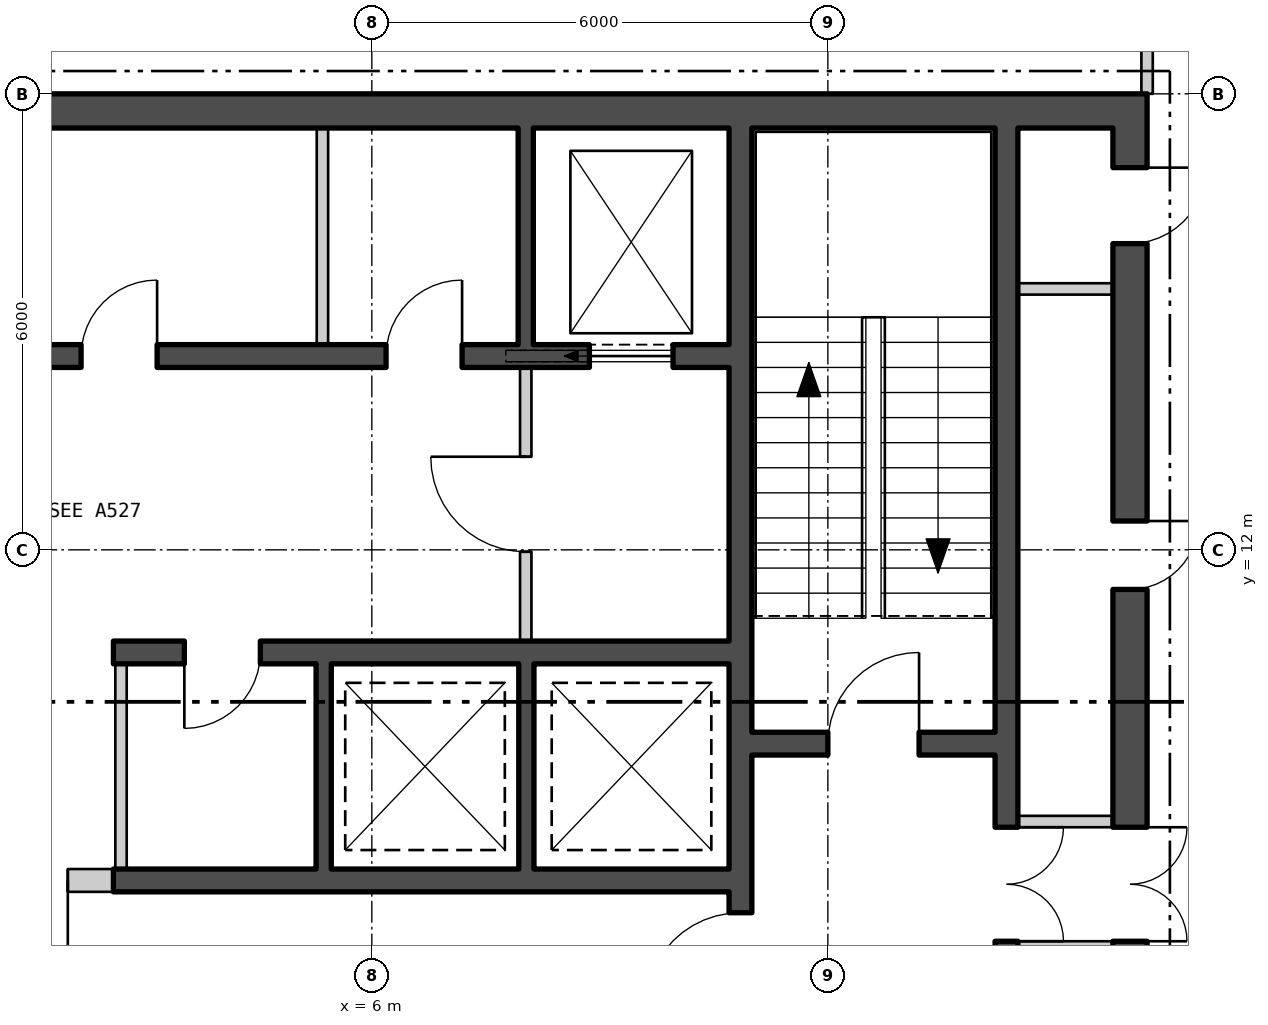
"""IFC4 building model, lengths in metres.
Left out: names, types, materials, properties, quantities, classifications, styles, units other than length and angle.
Written with IfcOpenShell. Run it as: python <this file> out.ifc"""

import sys

from ifc_helpers import new_model, si_unit, direction, frame, frame_2d, origin, place, context, subcontext, project, spatial, polyline, rectangle, outline, extrude, element, fill, save


model = new_model("IFC4")
c1 = context("Model", 3, precision=1e-05, world=origin(), true_north=direction((0.0, 1.0)))
c2 = subcontext(c1, "Body", "Model", "MODEL_VIEW")
j1 = project(units=[si_unit("LENGTHUNIT", "METRE"), si_unit("PLANEANGLEUNIT", "RADIAN")], contexts=[c1])
p1 = place(None, origin())
s1 = spatial("IfcSite", under=j1, at=p1, CompositionType="ELEMENT")
p2 = place(p1, origin())
s2 = spatial("IfcBuilding", under=s1, at=p2, CompositionType="ELEMENT")
p3 = place(p2, frame((0.0, 0.0, 216.0)))
s3 = spatial("IfcBuildingStorey", under=s2, at=p3, CompositionType="ELEMENT", Elevation=216.0)
p4 = place(p3, frame((3.36, -25.466, -0.18), z_axis=(0.0, 0.0, 1.0), x_axis=(0.500000335318, 0.866025210188, 0.0)))
e1 = element("IfcWall", 1, at=p4, inside=s3, PredefinedType="SOLIDWALL", context=c2, shape_type="SweptSolid", body=[
    extrude(outline(polyline([(-0.13, -0.225), (45.88, -0.225), (45.62, 0.225), (0.13, 0.225), (-0.13, -0.225)])), origin(), (0.0, 0.0, 1.0), 3.68),
])
p5 = place(p4, frame((1.425, 0.0, 1.08)))
e2 = element("IfcOpeningElement", 2, at=p5, cuts=e1, PredefinedType="OPENING", context=c2, shape_type="SweptSolid", body=[
    extrude(rectangle(XDim=2.4, YDim=2.0, at=frame_2d((1.2, 1.0))), frame((0.0, 0.235, 0.0), z_axis=(0.0, -1.0, 0.0), x_axis=(1.0, 0.0, 0.0)), (0.0, 0.0, 1.0), 0.47),
])
p6 = place(p4, frame((5.895, 0.0, 1.08)))
e3 = element("IfcOpeningElement", 3, at=p6, cuts=e1, PredefinedType="OPENING", context=c2, shape_type="SweptSolid", body=[
    extrude(rectangle(XDim=2.4, YDim=2.0, at=frame_2d((1.2, 1.0))), frame((0.0, 0.235, 0.0), z_axis=(0.0, -1.0, 0.0), x_axis=(1.0, 0.0, 0.0)), (0.0, 0.0, 1.0), 0.47),
])
p7 = place(p4, frame((10.403, 0.0, 1.08)))
e4 = element("IfcOpeningElement", 4, at=p7, cuts=e1, PredefinedType="OPENING", context=c2, shape_type="SweptSolid", body=[
    extrude(rectangle(XDim=2.4, YDim=2.0, at=frame_2d((1.2, 1.0))), frame((0.0, 0.235, 0.0), z_axis=(0.0, -1.0, 0.0), x_axis=(1.0, 0.0, 0.0)), (0.0, 0.0, 1.0), 0.47),
])
p8 = place(p4, frame((14.912, 0.0, 1.08)))
e5 = element("IfcOpeningElement", 5, at=p8, cuts=e1, PredefinedType="OPENING", context=c2, shape_type="SweptSolid", body=[
    extrude(rectangle(XDim=2.4, YDim=2.0, at=frame_2d((1.2, 1.0))), frame((0.0, 0.235, 0.0), z_axis=(0.0, -1.0, 0.0), x_axis=(1.0, 0.0, 0.0)), (0.0, 0.0, 1.0), 0.47),
])
p9 = place(p4, frame((19.421, 0.0, 1.08)))
e6 = element("IfcOpeningElement", 6, at=p9, cuts=e1, PredefinedType="OPENING", context=c2, shape_type="SweptSolid", body=[
    extrude(rectangle(XDim=2.4, YDim=2.0, at=frame_2d((1.2, 1.0))), frame((0.0, 0.235, 0.0), z_axis=(0.0, -1.0, 0.0), x_axis=(1.0, 0.0, 0.0)), (0.0, 0.0, 1.0), 0.47),
])
p10 = place(p4, frame((23.929, 0.0, 1.08)))
e7 = element("IfcOpeningElement", 7, at=p10, cuts=e1, PredefinedType="OPENING", context=c2, shape_type="SweptSolid", body=[
    extrude(rectangle(XDim=2.4, YDim=2.0, at=frame_2d((1.2, 1.0))), frame((0.0, 0.235, 0.0), z_axis=(0.0, -1.0, 0.0), x_axis=(1.0, 0.0, 0.0)), (0.0, 0.0, 1.0), 0.47),
])
p11 = place(p4, frame((32.947, 0.0, 1.08)))
e8 = element("IfcOpeningElement", 8, at=p11, cuts=e1, PredefinedType="OPENING", context=c2, shape_type="SweptSolid", body=[
    extrude(rectangle(XDim=2.4, YDim=2.0, at=frame_2d((1.2, 1.0))), frame((0.0, 0.235, 0.0), z_axis=(0.0, -1.0, 0.0), x_axis=(1.0, 0.0, 0.0)), (0.0, 0.0, 1.0), 0.47),
])
p12 = place(p4, frame((37.455, 0.0, 1.08)))
e9 = element("IfcOpeningElement", 9, at=p12, cuts=e1, PredefinedType="OPENING", context=c2, shape_type="SweptSolid", body=[
    extrude(rectangle(XDim=2.4, YDim=2.0, at=frame_2d((1.2, 1.0))), frame((0.0, 0.235, 0.0), z_axis=(0.0, -1.0, 0.0), x_axis=(1.0, 0.0, 0.0)), (0.0, 0.0, 1.0), 0.47),
])
p13 = place(p4, frame((41.925, 0.0, 1.08)))
e10 = element("IfcOpeningElement", 10, at=p13, cuts=e1, PredefinedType="OPENING", context=c2, shape_type="SweptSolid", body=[
    extrude(rectangle(XDim=2.4, YDim=2.0, at=frame_2d((1.2, 1.0))), frame((0.0, 0.235, 0.0), z_axis=(0.0, -1.0, 0.0), x_axis=(1.0, 0.0, 0.0)), (0.0, 0.0, 1.0), 0.47),
])
p14 = place(p3, frame((-16.2, 17.775, 0.0), z_axis=(0.0, 0.0, 1.0), x_axis=(1.0, 0.0, 0.0)))
e11 = element("IfcWall", 11, at=p14, inside=s3, PredefinedType="SHEAR", context=c2, shape_type="SweptSolid", body=[
    extrude(rectangle(XDim=32.4, YDim=0.45, at=frame_2d((16.2, 0.0))), origin(), (0.0, 0.0, 1.0), 3.7),
])
p15 = place(p3, frame((15.975, 2.45, 0.0), z_axis=(0.0, 0.0, 1.0), x_axis=(0.0, 1.0, 0.0)))
e12 = element("IfcWall", 12, at=p15, inside=s3, PredefinedType="SHEAR", context=c2, shape_type="SweptSolid", body=[
    extrude(rectangle(XDim=15.1, YDim=0.45, at=frame_2d((7.55, 0.0))), origin(), (0.0, 0.0, 1.0), 3.7),
])
p16 = place(p15, frame((4.4, 0.0, 0.0)))
e13 = element("IfcOpeningElement", 13, at=p16, cuts=e12, PredefinedType="OPENING", context=c2, shape_type="SweptSolid", body=[
    extrude(rectangle(XDim=1.5, YDim=2.1, at=frame_2d((0.75, 1.05))), frame((0.0, 0.235, 0.0), z_axis=(0.0, -1.0, 0.0), x_axis=(1.0, 0.0, 0.0)), (0.0, 0.0, 1.0), 0.47),
])
p17 = place(p15, frame((0.85, 0.0, 0.0)))
e14 = element("IfcOpeningElement", 14, at=p17, cuts=e12, PredefinedType="OPENING", context=c2, shape_type="SweptSolid", body=[
    extrude(rectangle(XDim=0.9, YDim=2.1, at=frame_2d((0.45, 1.05))), frame((0.0, 0.235, 0.0), z_axis=(0.0, -1.0, 0.0), x_axis=(1.0, 0.0, 0.0)), (0.0, 0.0, 1.0), 0.47),
])
p18 = place(p15, frame((3.05, 0.0, 0.0)))
e15 = element("IfcOpeningElement", 15, at=p18, cuts=e12, PredefinedType="OPENING", context=c2, shape_type="SweptSolid", body=[
    extrude(rectangle(XDim=0.9, YDim=2.1, at=frame_2d((0.45, 1.05))), frame((0.0, 0.235, 0.0), z_axis=(0.0, -1.0, 0.0), x_axis=(1.0, 0.0, 0.0)), (0.0, 0.0, 1.0), 0.47),
])
p19 = place(p15, frame((9.029, 0.0, 0.0)))
e16 = element("IfcOpeningElement", 16, at=p19, cuts=e12, PredefinedType="OPENING", context=c2, shape_type="SweptSolid", body=[
    extrude(rectangle(XDim=0.9, YDim=2.1, at=frame_2d((0.45, 1.05))), frame((0.0, 0.235, 0.0), z_axis=(0.0, -1.0, 0.0), x_axis=(1.0, 0.0, 0.0)), (0.0, 0.0, 1.0), 0.47),
])
p20 = place(p15, frame((13.579, 0.0, 0.0)))
e17 = element("IfcOpeningElement", 17, at=p20, cuts=e12, PredefinedType="OPENING", context=c2, shape_type="SweptSolid", body=[
    extrude(rectangle(XDim=1.0, YDim=2.1, at=frame_2d((0.5, 1.05))), frame((0.0, 0.235, 0.0), z_axis=(0.0, -1.0, 0.0), x_axis=(1.0, 0.0, 0.0)), (0.0, 0.0, 1.0), 0.47),
])
p21 = place(p3, frame((10.85, 2.45, 0.0), z_axis=(0.0, 0.0, 1.0), x_axis=(0.0, 1.0, 0.0)))
e18 = element("IfcWall", 18, at=p21, inside=s3, PredefinedType="SHEAR", context=c2, shape_type="SweptSolid", body=[
    extrude(rectangle(XDim=15.1, YDim=0.3, at=frame_2d((7.55, 0.0))), origin(), (0.0, 0.0, 1.0), 3.7),
])
p22 = place(p21, frame((3.525, 0.0, 0.0)))
e19 = element("IfcOpeningElement", 19, at=p22, cuts=e18, PredefinedType="OPENING", context=c2, shape_type="SweptSolid", body=[
    extrude(rectangle(XDim=1.25, YDim=2.1, at=frame_2d((0.625, 1.05))), frame((0.0, 0.16, 0.0), z_axis=(0.0, -1.0, 0.0), x_axis=(1.0, 0.0, 0.0)), (0.0, 0.0, 1.0), 0.32),
])
p23 = place(p21, frame((1.15, 0.0, 0.0)))
e20 = element("IfcOpeningElement", 20, at=p23, cuts=e18, PredefinedType="OPENING", context=c2, shape_type="SweptSolid", body=[
    extrude(rectangle(XDim=1.0, YDim=2.1, at=frame_2d((0.5, 1.05))), frame((0.0, 0.16, 0.0), z_axis=(0.0, -1.0, 0.0), x_axis=(1.0, 0.0, 0.0)), (0.0, 0.0, 1.0), 0.32),
])
p24 = place(p3, frame((14.35, 2.45, 0.0), z_axis=(0.0, 0.0, 1.0), x_axis=(0.0, 1.0, 0.0)))
e21 = element("IfcWall", 21, at=p24, inside=s3, PredefinedType="SHEAR", context=c2, shape_type="SweptSolid", body=[
    extrude(rectangle(XDim=15.1, YDim=0.3, at=frame_2d((7.55, 0.0))), origin(), (0.0, 0.0, 1.0), 3.7),
])
p25 = place(p24, frame((4.4, 0.0, 0.0)))
e22 = element("IfcOpeningElement", 22, at=p25, cuts=e21, PredefinedType="OPENING", context=c2, shape_type="SweptSolid", body=[
    extrude(rectangle(XDim=1.5, YDim=2.1, at=frame_2d((0.75, 1.05))), frame((0.0, 0.16, 0.0), z_axis=(0.0, -1.0, 0.0), x_axis=(1.0, 0.0, 0.0)), (0.0, 0.0, 1.0), 0.32),
])
p26 = place(p3, frame((11.0, 9.45, 0.0), z_axis=(0.0, 0.0, 1.0), x_axis=(1.0, 0.0, 0.0)))
e23 = element("IfcWall", 23, at=p26, inside=s3, PredefinedType="SHEAR", context=c2, shape_type="SweptSolid", body=[
    extrude(rectangle(XDim=3.2, YDim=0.3, at=frame_2d((1.6, 0.0))), origin(), (0.0, 0.0, 1.0), 3.7),
])
p27 = place(p26, frame((1.0, 0.0, 0.0)))
e24 = element("IfcOpeningElement", 24, at=p27, cuts=e23, PredefinedType="OPENING", context=c2, shape_type="SweptSolid", body=[
    extrude(rectangle(XDim=1.2, YDim=2.1, at=frame_2d((0.6, 1.05))), frame((0.0, 0.16, 0.0), z_axis=(0.0, -1.0, 0.0), x_axis=(1.0, 0.0, 0.0)), (0.0, 0.0, 1.0), 0.32),
])
p28 = place(p3, frame((-10.7, 14.55, 0.0), z_axis=(0.0, 0.0, 1.0), x_axis=(1.0, 0.0, 0.0)))
e25 = element("IfcWall", 25, at=p28, inside=s3, PredefinedType="SHEAR", context=c2, shape_type="SweptSolid", body=[
    extrude(rectangle(XDim=21.4, YDim=0.3, at=frame_2d((10.7, 0.0))), origin(), (0.0, 0.0, 1.0), 3.7),
])
p29 = place(p28, frame((0.738, 0.0, 0.0)))
e26 = element("IfcOpeningElement", 26, at=p29, cuts=e25, PredefinedType="OPENING", context=c2, shape_type="SweptSolid", body=[
    extrude(rectangle(XDim=1.1, YDim=2.1, at=frame_2d((0.55, 1.05))), frame((0.0, 0.16, 0.0), z_axis=(0.0, -1.0, 0.0), x_axis=(1.0, 0.0, 0.0)), (0.0, 0.0, 1.0), 0.32),
])
p30 = place(p28, frame((3.462, 0.0, 0.0)))
e27 = element("IfcOpeningElement", 27, at=p30, cuts=e25, PredefinedType="OPENING", context=c2, shape_type="SweptSolid", body=[
    extrude(rectangle(XDim=1.1, YDim=2.1, at=frame_2d((0.55, 1.05))), frame((0.0, 0.16, 0.0), z_axis=(0.0, -1.0, 0.0), x_axis=(1.0, 0.0, 0.0)), (0.0, 0.0, 1.0), 0.32),
])
p31 = place(p28, frame((6.138, 0.0, 0.0)))
e28 = element("IfcOpeningElement", 28, at=p31, cuts=e25, PredefinedType="OPENING", context=c2, shape_type="SweptSolid", body=[
    extrude(rectangle(XDim=1.1, YDim=2.1, at=frame_2d((0.55, 1.05))), frame((0.0, 0.16, 0.0), z_axis=(0.0, -1.0, 0.0), x_axis=(1.0, 0.0, 0.0)), (0.0, 0.0, 1.0), 0.32),
])
p32 = place(p28, frame((8.812, 0.0, 0.0)))
e29 = element("IfcOpeningElement", 29, at=p32, cuts=e25, PredefinedType="OPENING", context=c2, shape_type="SweptSolid", body=[
    extrude(rectangle(XDim=1.1, YDim=2.1, at=frame_2d((0.55, 1.05))), frame((0.0, 0.16, 0.0), z_axis=(0.0, -1.0, 0.0), x_axis=(1.0, 0.0, 0.0)), (0.0, 0.0, 1.0), 0.32),
])
p33 = place(p28, frame((19.562, 0.0, 0.0)))
e30 = element("IfcOpeningElement", 30, at=p33, cuts=e25, PredefinedType="OPENING", context=c2, shape_type="SweptSolid", body=[
    extrude(rectangle(XDim=1.1, YDim=2.1, at=frame_2d((0.55, 1.05))), frame((0.0, 0.16, 0.0), z_axis=(0.0, -1.0, 0.0), x_axis=(1.0, 0.0, 0.0)), (0.0, 0.0, 1.0), 0.32),
])
p34 = place(p28, frame((12.875, 0.0, 0.0)))
e31 = element("IfcOpeningElement", 31, at=p34, cuts=e25, PredefinedType="OPENING", context=c2, shape_type="SweptSolid", body=[
    extrude(rectangle(XDim=1.0, YDim=2.1, at=frame_2d((0.5, 1.05))), frame((0.0, 0.16, 0.0), z_axis=(0.0, -1.0, 0.0), x_axis=(1.0, 0.0, 0.0)), (0.0, 0.0, 1.0), 0.32),
])
p35 = place(p28, frame((16.887, 0.0, 0.0)))
e32 = element("IfcOpeningElement", 32, at=p35, cuts=e25, PredefinedType="OPENING", context=c2, shape_type="SweptSolid", body=[
    extrude(rectangle(XDim=1.0, YDim=2.1, at=frame_2d((0.5, 1.05))), frame((0.0, 0.16, 0.0), z_axis=(0.0, -1.0, 0.0), x_axis=(1.0, 0.0, 0.0)), (0.0, 0.0, 1.0), 0.32),
])
p36 = place(p3, frame((2.6, 10.65, 0.0), z_axis=(0.0, 0.0, 1.0), x_axis=(1.0, 0.0, 0.0)))
e33 = element("IfcWall", 33, at=p36, inside=s3, PredefinedType="SHEAR", context=c2, shape_type="SweptSolid", body=[
    extrude(rectangle(XDim=8.1, YDim=0.3, at=frame_2d((4.05, 0.0))), origin(), (0.0, 0.0, 1.0), 3.7),
])
p37 = place(p36, frame((0.933, 0.0, 0.0)))
e34 = element("IfcOpeningElement", 34, at=p37, cuts=e33, PredefinedType="OPENING", context=c2, shape_type="SweptSolid", body=[
    extrude(rectangle(XDim=1.0, YDim=2.1, at=frame_2d((0.5, 1.05))), frame((0.0, 0.16, 0.0), z_axis=(0.0, -1.0, 0.0), x_axis=(1.0, 0.0, 0.0)), (0.0, 0.0, 1.0), 0.32),
])
p38 = place(p3, frame((2.6, 7.65, 0.0), z_axis=(0.0, 0.0, 1.0), x_axis=(1.0, 0.0, 0.0)))
e35 = element("IfcWall", 35, at=p38, inside=s3, PredefinedType="SHEAR", context=c2, shape_type="SweptSolid", body=[
    extrude(rectangle(XDim=8.1, YDim=0.3, at=frame_2d((4.05, 0.0))), origin(), (0.0, 0.0, 1.0), 3.7),
])
p39 = place(p3, frame((5.35, 14.7, 0.0), z_axis=(0.0, 0.0, 1.0), x_axis=(0.0, 1.0, 0.0)))
e36 = element("IfcWall", 36, at=p39, inside=s3, PredefinedType="PARTITIONING", context=c2, shape_type="SweptSolid", body=[
    extrude(rectangle(XDim=2.85, YDim=0.15, at=frame_2d((1.425, 0.0))), origin(), (0.0, 0.0, 1.0), 3.7),
])
p40 = place(p3, frame((8.025, 14.7, 0.0), z_axis=(0.0, 0.0, 1.0), x_axis=(0.0, 1.0, 0.0)))
e37 = element("IfcWall", 37, at=p40, inside=s3, PredefinedType="SHEAR", context=c2, shape_type="SweptSolid", body=[
    extrude(rectangle(XDim=2.85, YDim=0.2, at=frame_2d((1.425, 0.0))), origin(), (0.0, 0.0, 1.0), 3.7),
])
p41 = place(p3, frame((2.7, 7.8, 0.0), z_axis=(0.0, 0.0, 1.0), x_axis=(0.0, 1.0, 0.0)))
e38 = element("IfcWall", 38, at=p41, inside=s3, PredefinedType="PARTITIONING", context=c2, shape_type="SweptSolid", body=[
    extrude(rectangle(XDim=2.7, YDim=0.15, at=frame_2d((1.35, 0.0))), origin(), (0.0, 0.0, 1.0), 3.7),
])
for number, where, z_axis, x_axis in (
    (39, (5.367, 7.8, 0.0), (0.0, 0.0, 1.0), (0.0, 1.0, 0.0)),
    (40, (8.033, 7.8, 0.0), (0.0, 0.0, 1.0), (0.0, 1.0, 0.0)),
):
    element("IfcWall", number, at=place(p3, frame(where, z_axis=z_axis, x_axis=x_axis)), inside=s3, PredefinedType="SHEAR", context=c2, shape_type="SweptSolid", body=[
        extrude(rectangle(XDim=2.7, YDim=0.2, at=frame_2d((1.35, 0.0))), origin(), (0.0, 0.0, 1.0), 3.7),
    ])
p42 = place(p3, frame((8.025, 10.8, 0.0), z_axis=(0.0, 0.0, 1.0), x_axis=(0.0, 1.0, 0.0)))
e41 = element("IfcWall", 41, at=p42, inside=s3, PredefinedType="PARTITIONING", context=c2, shape_type="SweptSolid", body=[
    extrude(rectangle(XDim=3.6, YDim=0.15, at=frame_2d((1.8, 0.0))), origin(), (0.0, 0.0, 1.0), 3.7),
])
p43 = place(p42, frame((1.175, 0.0, 0.0)))
e42 = element("IfcOpeningElement", 42, at=p43, cuts=e41, PredefinedType="OPENING", context=c2, shape_type="SweptSolid", body=[
    extrude(rectangle(XDim=1.25, YDim=2.1, at=frame_2d((0.625, 1.05))), frame((0.0, 0.085, 0.0), z_axis=(0.0, -1.0, 0.0), x_axis=(1.0, 0.0, 0.0)), (0.0, 0.0, 1.0), 0.17),
])
for number, where, z_axis, x_axis in (
    (43, (14.5, 6.775, 0.0), (0.0, 0.0, 1.0), (1.0, 0.0, 0.0)),
    (44, (14.5, 8.425, 0.0), (0.0, 0.0, 1.0), (1.0, 0.0, 0.0)),
    (45, (14.5, 15.433, 0.0), (0.0, 0.0, 1.0), (1.0, 0.0, 0.0)),
):
    element("IfcWall", number, at=place(p3, frame(where, z_axis=z_axis, x_axis=x_axis)), inside=s3, PredefinedType="PARTITIONING", context=c2, shape_type="SweptSolid", body=[
        extrude(rectangle(XDim=1.25, YDim=0.15, at=frame_2d((0.625, 0.0))), origin(), (0.0, 0.0, 1.0), 3.7),
    ])
p44 = place(p3, frame((-0.4, 7.65, 0.0), z_axis=(0.0, 0.0, 1.0), x_axis=(1.0, 0.0, 0.0)))
e46 = element("IfcWall", 46, at=p44, inside=s3, PredefinedType="PARTITIONING", context=c2, shape_type="SweptSolid", body=[
    extrude(rectangle(XDim=3.0, YDim=0.3, at=frame_2d((1.5, 0.0))), origin(), (0.0, 0.0, 1.0), 3.7),
])
p45 = place(p44, frame((0.6, 0.0, 0.0)))
e47 = element("IfcOpeningElement", 47, at=p45, cuts=e46, PredefinedType="OPENING", context=c2, shape_type="SweptSolid", body=[
    extrude(rectangle(XDim=1.8, YDim=2.4, at=frame_2d((0.9, 1.2))), frame((0.0, 0.16, 0.0), z_axis=(0.0, -1.0, 0.0), x_axis=(1.0, 0.0, 0.0)), (0.0, 0.0, 1.0), 0.32),
])
p46 = place(p3, frame((16.2, 18.0, 0.0), z_axis=(0.0, 0.0, 1.0), x_axis=(0.0, 1.0, 0.0)))
e48 = element("IfcWall", 48, at=p46, inside=s3, PredefinedType="PARTITIONING", context=c2, shape_type="SweptSolid", body=[
    extrude(rectangle(XDim=1.75, YDim=0.15, at=frame_2d((0.875, 0.0))), origin(), (0.0, 0.0, 1.0), 3.7),
])
p47 = place(p33, origin())
e49 = element("IfcDoor", 49, at=p47, inside=s3, OperationType="SLIDING_TO_LEFT", PredefinedType="DOOR", context=c2, shape_type="SweptSolid", body=[
    extrude(rectangle(XDim=1.1, YDim=2.1, at=frame_2d((0.55, 1.05))), frame((0.0, 0.025, 0.0), z_axis=(0.0, -1.0, 0.0), x_axis=(1.0, 0.0, 0.0)), (0.0, 0.0, 1.0), 0.05),
])
fill(e30, e49)
p48 = place(p34, origin())
e50 = element("IfcDoor", 50, at=p48, inside=s3, OperationType="SINGLE_SWING_LEFT", PredefinedType="DOOR", context=c2, shape_type="SweptSolid", body=[
    extrude(rectangle(XDim=1.0, YDim=2.1, at=frame_2d((0.5, 1.05))), frame((0.0, 0.025, 0.0), z_axis=(0.0, -1.0, 0.0), x_axis=(1.0, 0.0, 0.0)), (0.0, 0.0, 1.0), 0.05),
])
fill(e31, e50)
p49 = place(p35, origin())
e51 = element("IfcDoor", 51, at=p49, inside=s3, OperationType="SINGLE_SWING_LEFT", PredefinedType="DOOR", context=c2, shape_type="SweptSolid", body=[
    extrude(rectangle(XDim=1.0, YDim=2.1, at=frame_2d((0.5, 1.05))), frame((0.0, 0.025, 0.0), z_axis=(0.0, -1.0, 0.0), x_axis=(1.0, 0.0, 0.0)), (0.0, 0.0, 1.0), 0.05),
])
fill(e32, e51)
p50 = place(p37, origin())
e52 = element("IfcDoor", 52, at=p50, inside=s3, OperationType="SINGLE_SWING_LEFT", PredefinedType="DOOR", context=c2, shape_type="SweptSolid", body=[
    extrude(rectangle(XDim=1.0, YDim=2.1, at=frame_2d((0.5, 1.05))), frame((0.0, 0.025, 0.0), z_axis=(0.0, -1.0, 0.0), x_axis=(1.0, 0.0, 0.0)), (0.0, 0.0, 1.0), 0.05),
])
fill(e34, e52)
p51 = place(p43, origin())
e53 = element("IfcDoor", 53, at=p51, inside=s3, OperationType="SINGLE_SWING_LEFT", PredefinedType="DOOR", context=c2, shape_type="SweptSolid", body=[
    extrude(rectangle(XDim=1.25, YDim=2.1, at=frame_2d((0.625, 1.05))), frame((0.0, 0.025, 0.0), z_axis=(0.0, -1.0, 0.0), x_axis=(1.0, 0.0, 0.0)), (0.0, 0.0, 1.0), 0.05),
])
fill(e42, e53)
p52 = place(p27, origin())
e54 = element("IfcDoor", 54, at=p52, inside=s3, OperationType="SINGLE_SWING_LEFT", PredefinedType="DOOR", context=c2, shape_type="SweptSolid", body=[
    extrude(rectangle(XDim=1.2, YDim=2.1, at=frame_2d((0.6, 1.05))), frame((0.0, 0.025, 0.0), z_axis=(0.0, -1.0, 0.0), x_axis=(1.0, 0.0, 0.0)), (0.0, 0.0, 1.0), 0.05),
])
fill(e24, e54)
p53 = place(p22, origin())
e55 = element("IfcDoor", 55, at=p53, inside=s3, OperationType="SINGLE_SWING_RIGHT", PredefinedType="DOOR", context=c2, shape_type="SweptSolid", body=[
    extrude(rectangle(XDim=1.25, YDim=2.1, at=frame_2d((0.625, 1.05))), frame((0.0, 0.025, 0.0), z_axis=(0.0, -1.0, 0.0), x_axis=(1.0, 0.0, 0.0)), (0.0, 0.0, 1.0), 0.05),
])
fill(e19, e55)
p54 = place(p25, origin())
e56 = element("IfcDoor", 56, at=p54, inside=s3, OperationType="DOUBLE_DOOR_SINGLE_SWING", PredefinedType="DOOR", context=c2, shape_type="SweptSolid", body=[
    extrude(rectangle(XDim=1.5, YDim=2.1, at=frame_2d((0.75, 1.05))), frame((0.0, 0.025, 0.0), z_axis=(0.0, -1.0, 0.0), x_axis=(1.0, 0.0, 0.0)), (0.0, 0.0, 1.0), 0.05),
])
fill(e22, e56)
p55 = place(p16, origin())
e57 = element("IfcDoor", 57, at=p55, inside=s3, OperationType="DOUBLE_DOOR_SINGLE_SWING", PredefinedType="DOOR", context=c2, shape_type="SweptSolid", body=[
    extrude(rectangle(XDim=1.5, YDim=2.1, at=frame_2d((0.75, 1.05))), frame((0.0, 0.025, 0.0), z_axis=(0.0, -1.0, 0.0), x_axis=(1.0, 0.0, 0.0)), (0.0, 0.0, 1.0), 0.05),
])
fill(e13, e57)
p56 = place(p19, origin())
e58 = element("IfcDoor", 58, at=p56, inside=s3, OperationType="SINGLE_SWING_RIGHT", PredefinedType="DOOR", context=c2, shape_type="SweptSolid", body=[
    extrude(rectangle(XDim=0.9, YDim=2.1, at=frame_2d((0.45, 1.05))), frame((0.0, 0.025, 0.0), z_axis=(0.0, -1.0, 0.0), x_axis=(1.0, 0.0, 0.0)), (0.0, 0.0, 1.0), 0.05),
])
fill(e16, e58)
p57 = place(p20, origin())
e59 = element("IfcDoor", 59, at=p57, inside=s3, OperationType="SINGLE_SWING_RIGHT", PredefinedType="DOOR", context=c2, shape_type="SweptSolid", body=[
    extrude(rectangle(XDim=1.0, YDim=2.1, at=frame_2d((0.5, 1.05))), frame((0.0, 0.025, 0.0), z_axis=(0.0, -1.0, 0.0), x_axis=(1.0, 0.0, 0.0)), (0.0, 0.0, 1.0), 0.05),
])
fill(e17, e59)
p58 = place(p45, origin())
e60 = element("IfcDoor", 60, at=p58, inside=s3, OperationType="DOUBLE_DOOR_SINGLE_SWING", PredefinedType="DOOR", context=c2, shape_type="SweptSolid", body=[
    extrude(rectangle(XDim=1.8, YDim=2.4, at=frame_2d((0.9, 1.2))), frame((0.0, 0.025, 0.0), z_axis=(0.0, -1.0, 0.0), x_axis=(1.0, 0.0, 0.0)), (0.0, 0.0, 1.0), 0.05),
])
fill(e47, e60)
save(model, sys.argv[1])
